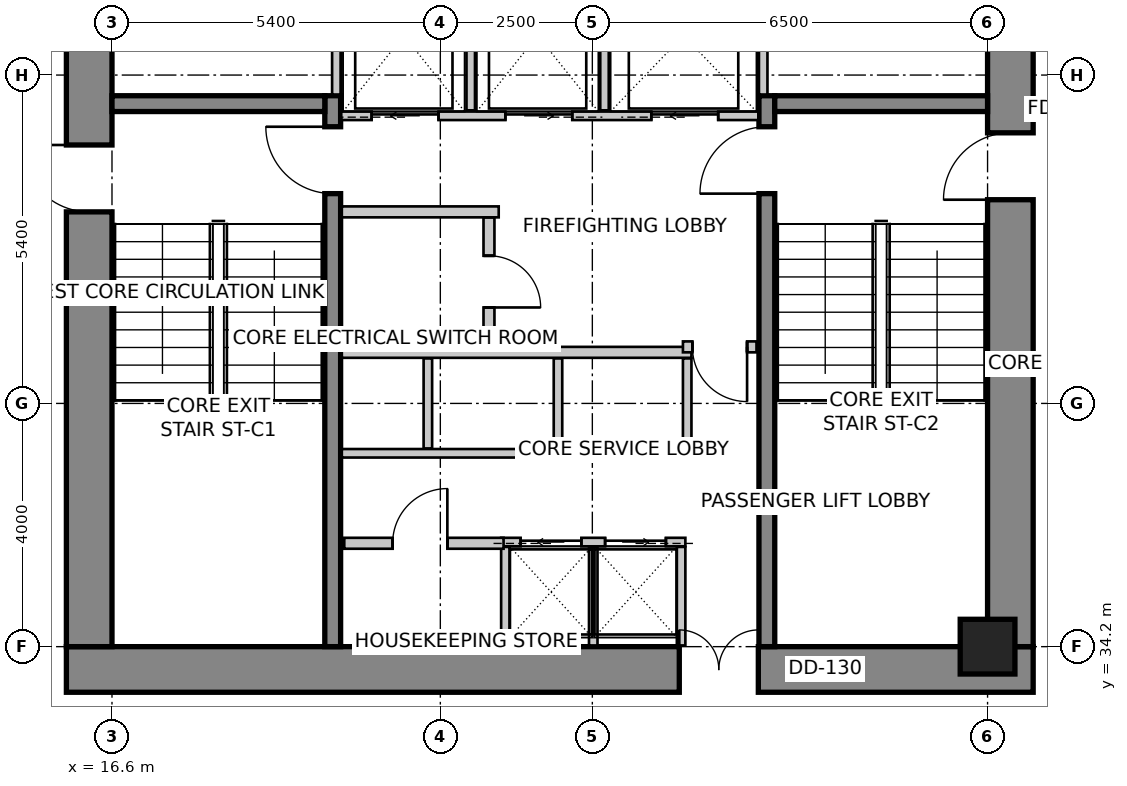
"""IFC4 building model, lengths in metres.
Left out: names, types, materials, properties, quantities, classifications, styles, units other than length and angle.
Written with IfcOpenShell. Run it as: python <this file> out.ifc"""

import sys

from ifc_helpers import new_model, si_unit, direction, frame, frame_2d, origin, origin_2d, place, context, subcontext, project, spatial, rectangle, extrude, source, transform, mapped, element, fill, save


model = new_model("IFC4")
c1 = context("Model", 3, precision=1e-05, world=origin(), true_north=direction((0.0, 1.0)))
c2 = subcontext(c1, "Body", "Model", "MODEL_VIEW")
j1 = project(units=[si_unit("LENGTHUNIT", "METRE"), si_unit("PLANEANGLEUNIT", "RADIAN")], contexts=[c1])
p1 = place(None, origin())
s1 = spatial("IfcSite", under=j1, at=p1, CompositionType="ELEMENT")
p2 = place(p1, origin())
s2 = spatial("IfcBuilding", under=s1, at=p2, CompositionType="ELEMENT")
p3 = place(p2, frame((0.0, 0.0, 128.6)))
s3 = spatial("IfcBuildingStorey", under=s2, at=p3, CompositionType="ELEMENT", Elevation=128.6)
p4 = place(p3, frame((15.85, 33.825, 0.0), z_axis=(0.0, 0.0, 1.0), x_axis=(1.0, 0.0, 0.0)))
e1 = element("IfcWall", 1, at=p4, inside=s3, PredefinedType="SHEAR", context=c2, shape_type="SweptSolid", body=[
    extrude(rectangle(XDim=15.9, YDim=0.75, at=frame_2d((7.95, 0.0))), origin(), (0.0, 0.0, 1.0), 3.6),
])
m1 = source(origin(), c2, "Body", "SweptSolid", [
    extrude(rectangle(XDim=1.3, YDim=2.15, at=frame_2d((0.65, 1.075))), frame((0.0, 0.385, 0.0), z_axis=(0.0, -1.0, 0.0), x_axis=(1.0, 0.0, 0.0)), (0.0, 0.0, 1.0), 0.77),
])
p5 = place(p4, frame((10.08, 0.0, 0.0)))
e2 = element("IfcOpeningElement", 2, at=p5, cuts=e1, PredefinedType="OPENING", context=c2, shape_type="MappedRepresentation", body=[
    mapped(m1, transform((0.0, 0.0, 0.0), scale=1.0)),
])
p6 = place(p3, frame((16.225, 34.2, 0.0), z_axis=(0.0, 0.0, 1.0), x_axis=(0.0, 1.0, 0.0)))
e3 = element("IfcWall", 3, at=p6, inside=s3, PredefinedType="SHEAR", context=c2, shape_type="SweptSolid", body=[
    extrude(rectangle(XDim=11.4, YDim=0.75, at=frame_2d((5.7, 0.0))), origin(), (0.0, 0.0, 1.0), 3.6),
])
m2 = source(origin(), c2, "Body", "SweptSolid", [
    extrude(rectangle(XDim=1.1, YDim=2.15, at=frame_2d((0.55, 1.075))), frame((0.0, 0.385, 0.0), z_axis=(0.0, -1.0, 0.0), x_axis=(1.0, 0.0, 0.0)), (0.0, 0.0, 1.0), 0.77),
])
p7 = place(p6, frame((7.15, 0.0, 0.0)))
e4 = element("IfcOpeningElement", 4, at=p7, cuts=e3, PredefinedType="OPENING", context=c2, shape_type="MappedRepresentation", body=[
    mapped(m2, transform((0.0, 0.0, 0.0), scale=1.0)),
])
p8 = place(p3, frame((31.375, 34.2, 0.0), z_axis=(0.0, 0.0, 1.0), x_axis=(0.0, 1.0, 0.0)))
e5 = element("IfcWall", 5, at=p8, inside=s3, PredefinedType="SHEAR", context=c2, shape_type="SweptSolid", body=[
    extrude(rectangle(XDim=11.4, YDim=0.75, at=frame_2d((5.7, 0.0))), origin(), (0.0, 0.0, 1.0), 3.6),
])
p9 = place(p8, frame((7.35, 0.0, 0.0)))
e6 = element("IfcOpeningElement", 6, at=p9, cuts=e5, PredefinedType="OPENING", context=c2, shape_type="MappedRepresentation", body=[
    mapped(m2, transform((0.0, 0.0, 0.0), scale=1.0)),
])
p10 = place(p3, frame((20.23, 34.2, 0.0), z_axis=(0.0, 0.0, 1.0), x_axis=(0.0, 1.0, 0.0)))
e7 = element("IfcWall", 7, at=p10, inside=s3, PredefinedType="SHEAR", context=c2, shape_type="SweptSolid", body=[
    extrude(rectangle(XDim=9.06, YDim=0.26, at=frame_2d((4.53, 0.0))), origin(), (0.0, 0.0, 1.0), 3.6),
])
m3 = source(origin(), c2, "Body", "SweptSolid", [
    extrude(rectangle(XDim=1.1, YDim=2.15, at=frame_2d((0.55, 1.075))), frame((0.0, 0.14, 0.0), z_axis=(0.0, -1.0, 0.0), x_axis=(1.0, 0.0, 0.0)), (0.0, 0.0, 1.0), 0.28),
])
p11 = place(p10, frame((7.45, 0.0, 0.0)))
e8 = element("IfcOpeningElement", 8, at=p11, cuts=e7, PredefinedType="OPENING", context=c2, shape_type="MappedRepresentation", body=[
    mapped(m3, transform((0.0, 0.0, 0.0), scale=1.0)),
])
p12 = place(p3, frame((27.37, 34.2, 0.0), z_axis=(0.0, 0.0, 1.0), x_axis=(0.0, 1.0, 0.0)))
e9 = element("IfcWall", 9, at=p12, inside=s3, PredefinedType="SHEAR", context=c2, shape_type="SweptSolid", body=[
    extrude(rectangle(XDim=9.06, YDim=0.26, at=frame_2d((4.53, 0.0))), origin(), (0.0, 0.0, 1.0), 3.6),
])
p13 = place(p12, frame((7.45, 0.0, 0.0)))
e10 = element("IfcOpeningElement", 10, at=p13, cuts=e9, PredefinedType="OPENING", context=c2, shape_type="MappedRepresentation", body=[
    mapped(m3, transform((0.0, 0.0, 0.0), scale=1.0)),
])
for number, where, z_axis, x_axis in (
    (11, (16.6, 43.13, 0.0), (0.0, 0.0, 1.0), (1.0, 0.0, 0.0)),
    (12, (27.5, 43.13, 0.0), (0.0, 0.0, 1.0), (1.0, 0.0, 0.0)),
):
    element("IfcWall", number, at=place(p3, frame(where, z_axis=z_axis, x_axis=x_axis)), inside=s3, PredefinedType="SHEAR", context=c2, shape_type="SweptSolid", body=[
        extrude(rectangle(XDim=3.5, YDim=0.26, at=frame_2d((1.75, 0.0))), origin(), (0.0, 0.0, 1.0), 3.6),
    ])
m4 = source(origin(), c2, "Body", "SweptSolid", [
    extrude(rectangle(XDim=0.9, YDim=0.9, at=origin_2d()), origin(), (0.0, 0.0, 1.0), 3.6),
])
p14 = place(p3, frame((31.0, 34.2, 0.0), z_axis=(0.0, 0.0, 1.0), x_axis=(1.0, 0.0, 0.0)))
e13 = element("IfcColumn", 13, at=p14, inside=s3, PredefinedType="COLUMN", context=c2, shape_type="MappedRepresentation", body=[
    mapped(m4, transform((0.0, 0.0, 0.0), scale=1.0)),
])
p15 = place(p3, frame((20.37, 42.93, 0.0), z_axis=(0.0, 0.0, 1.0), x_axis=(1.0, 0.0, 0.0)))
e14 = element("IfcWall", 14, at=p15, inside=s3, PredefinedType="SOLIDWALL", context=c2, shape_type="SweptSolid", body=[
    extrude(rectangle(XDim=6.86, YDim=0.14, at=frame_2d((3.43, 0.0))), origin(), (0.0, 0.0, 1.0), 3.35),
])
m5 = source(origin(), c2, "Body", "SweptSolid", [
    extrude(rectangle(XDim=1.1, YDim=2.15, at=frame_2d((0.55, 1.075))), frame((0.0, 0.08, 0.0), z_axis=(0.0, -1.0, 0.0), x_axis=(1.0, 0.0, 0.0)), (0.0, 0.0, 1.0), 0.16),
])
p16 = place(p15, frame((0.5, 0.0, 0.0)))
e15 = element("IfcOpeningElement", 15, at=p16, cuts=e14, PredefinedType="OPENING", context=c2, shape_type="MappedRepresentation", body=[
    mapped(m5, transform((0.0, 0.0, 0.0), scale=1.0)),
])
p17 = place(p15, frame((2.7, 0.0, 0.0)))
e16 = element("IfcOpeningElement", 16, at=p17, cuts=e14, PredefinedType="OPENING", context=c2, shape_type="MappedRepresentation", body=[
    mapped(m5, transform((0.0, 0.0, 0.0), scale=1.0)),
])
p18 = place(p15, frame((5.1, 0.0, 0.0)))
e17 = element("IfcOpeningElement", 17, at=p18, cuts=e14, PredefinedType="OPENING", context=c2, shape_type="MappedRepresentation", body=[
    mapped(m5, transform((0.0, 0.0, 0.0), scale=1.0)),
])
for number, where, z_axis, x_axis in (
    (18, (20.29, 43.28, 0.0), (0.0, 0.0, 1.0), (0.0, 1.0, 0.0)),
    (19, (27.31, 43.28, 0.0), (0.0, 0.0, 1.0), (0.0, 1.0, 0.0)),
):
    element("IfcWall", number, at=place(p3, frame(where, z_axis=z_axis, x_axis=x_axis)), inside=s3, PredefinedType="SOLIDWALL", context=c2, shape_type="SweptSolid", body=[
        extrude(rectangle(XDim=2.3, YDim=0.14, at=frame_2d((1.15, 0.0))), origin(), (0.0, 0.0, 1.0), 3.35),
    ])
for number, where, z_axis, x_axis in (
    (20, (22.5, 43.02, 0.0), (0.0, 0.0, 1.0), (0.0, 1.0, 0.0)),
    (21, (24.7, 43.02, 0.0), (0.0, 0.0, 1.0), (0.0, 1.0, 0.0)),
):
    element("IfcWall", number, at=place(p3, frame(where, z_axis=z_axis, x_axis=x_axis)), inside=s3, PredefinedType="SOLIDWALL", context=c2, shape_type="SweptSolid", body=[
        extrude(rectangle(XDim=2.56, YDim=0.14, at=frame_2d((1.28, 0.0))), origin(), (0.0, 0.0, 1.0), 3.35),
    ])
p19 = place(p3, frame((23.0, 35.92, 0.0), z_axis=(0.0, 0.0, 1.0), x_axis=(1.0, 0.0, 0.0)))
e22 = element("IfcWall", 22, at=p19, inside=s3, PredefinedType="SOLIDWALL", context=c2, shape_type="SweptSolid", body=[
    extrude(rectangle(XDim=3.03, YDim=0.14, at=frame_2d((1.515, 0.0))), origin(), (0.0, 0.0, 1.0), 3.35),
])
m6 = source(origin(), c2, "Body", "SweptSolid", [
    extrude(rectangle(XDim=1.0, YDim=2.15, at=frame_2d((0.5, 1.075))), frame((0.0, 0.08, 0.0), z_axis=(0.0, -1.0, 0.0), x_axis=(1.0, 0.0, 0.0)), (0.0, 0.0, 1.0), 0.16),
])
p20 = place(p19, frame((0.32, 0.0, 0.0)))
e23 = element("IfcOpeningElement", 23, at=p20, cuts=e22, PredefinedType="OPENING", context=c2, shape_type="MappedRepresentation", body=[
    mapped(m6, transform((0.0, 0.0, 0.0), scale=1.0)),
])
p21 = place(p19, frame((1.71, 0.0, 0.0)))
e24 = element("IfcOpeningElement", 24, at=p21, cuts=e22, PredefinedType="OPENING", context=c2, shape_type="MappedRepresentation", body=[
    mapped(m6, transform((0.0, 0.0, 0.0), scale=1.0)),
])
for number, where, z_axis, x_axis in (
    (25, (25.96, 34.22, 0.0), (0.0, 0.0, 1.0), (0.0, 1.0, 0.0)),
    (26, (23.07, 34.22, 0.0), (0.0, 0.0, 1.0), (0.0, 1.0, 0.0)),
    (27, (24.515, 34.22, 0.0), (0.0, 0.0, 1.0), (0.0, 1.0, 0.0)),
):
    element("IfcWall", number, at=place(p3, frame(where, z_axis=z_axis, x_axis=x_axis)), inside=s3, PredefinedType="SOLIDWALL", context=c2, shape_type="SweptSolid", body=[
        extrude(rectangle(XDim=1.62, YDim=0.14, at=frame_2d((0.81, 0.0))), origin(), (0.0, 0.0, 1.0), 2.642),
    ])
p22 = place(p3, frame((20.38, 37.38, 0.0), z_axis=(0.0, 0.0, 1.0), x_axis=(1.0, 0.0, 0.0)))
e28 = element("IfcWall", 28, at=p22, inside=s3, PredefinedType="SOLIDWALL", context=c2, shape_type="SweptSolid", body=[
    extrude(rectangle(XDim=5.75, YDim=0.14, at=frame_2d((2.875, 0.0))), origin(), (0.0, 0.0, 1.0), 3.35),
])
p23 = place(p3, frame((20.38, 39.04, 0.0), z_axis=(0.0, 0.0, 1.0), x_axis=(1.0, 0.0, 0.0)))
e29 = element("IfcWall", 29, at=p23, inside=s3, PredefinedType="SOLIDWALL", context=c2, shape_type="SweptSolid", body=[
    extrude(rectangle(XDim=5.75, YDim=0.18, at=frame_2d((2.875, 0.0))), origin(), (0.0, 0.0, 1.0), 3.35),
])
for number, where, z_axis, x_axis in (
    (30, (26.06, 37.46, 0.0), (0.0, 0.0, 1.0), (0.0, 1.0, 0.0)),
    (31, (21.795, 37.46, 0.0), (0.0, 0.0, 1.0), (0.0, 1.0, 0.0)),
    (32, (23.935, 37.46, 0.0), (0.0, 0.0, 1.0), (0.0, 1.0, 0.0)),
):
    element("IfcWall", number, at=place(p3, frame(where, z_axis=z_axis, x_axis=x_axis)), inside=s3, PredefinedType="SOLIDWALL", context=c2, shape_type="SweptSolid", body=[
        extrude(rectangle(XDim=1.48, YDim=0.14, at=frame_2d((0.74, 0.0))), origin(), (0.0, 0.0, 1.0), 3.35),
    ])
p24 = place(p3, frame((22.96, 41.35, 0.0), z_axis=(0.0, 0.0, 1.0), x_axis=(-1.0, 0.0, 0.0)))
e33 = element("IfcWall", 33, at=p24, inside=s3, PredefinedType="PARTITIONING", context=c2, shape_type="SweptSolid", body=[
    extrude(rectangle(XDim=2.58, YDim=0.18, at=frame_2d((1.29, 0.0))), origin(), (0.0, 0.0, 1.0), 3.35),
])
p25 = place(p3, frame((22.8, 41.256, 0.0), z_axis=(0.0, 0.0, 1.0), x_axis=(0.0, -1.0, 0.0)))
e34 = element("IfcWall", 34, at=p25, inside=s3, PredefinedType="PARTITIONING", context=c2, shape_type="SweptSolid", body=[
    extrude(rectangle(XDim=2.106, YDim=0.18, at=frame_2d((1.053, 0.0))), origin(), (0.0, 0.0, 1.0), 3.35),
])
m7 = source(origin(), c2, "Body", "SweptSolid", [
    extrude(rectangle(XDim=0.85, YDim=2.15, at=frame_2d((0.425, 1.075))), frame((0.0, 0.1, 0.0), z_axis=(0.0, -1.0, 0.0), x_axis=(1.0, 0.0, 0.0)), (0.0, 0.0, 1.0), 0.2),
])
p26 = place(p25, frame((0.628, 0.0, 0.0)))
e35 = element("IfcOpeningElement", 35, at=p26, cuts=e34, PredefinedType="OPENING", context=c2, shape_type="MappedRepresentation", body=[
    mapped(m7, transform((0.0, 0.0, 0.0), scale=1.0)),
])
p27 = place(p3, frame((27.2, 39.13, 0.0), z_axis=(0.0, 0.0, 1.0), x_axis=(-1.0, 0.0, 0.0)))
e36 = element("IfcWall", 36, at=p27, inside=s3, PredefinedType="PARTITIONING", context=c2, shape_type="SweptSolid", body=[
    extrude(rectangle(XDim=1.21, YDim=0.18, at=frame_2d((0.605, 0.0))), origin(), (0.0, 0.0, 1.0), 3.35),
])
m8 = source(origin(), c2, "Body", "SweptSolid", [
    extrude(rectangle(XDim=0.9, YDim=2.15, at=frame_2d((0.45, 1.075))), frame((0.0, 0.1, 0.0), z_axis=(0.0, -1.0, 0.0), x_axis=(1.0, 0.0, 0.0)), (0.0, 0.0, 1.0), 0.2),
])
p28 = place(p27, frame((0.155, 0.0, 0.0)))
e37 = element("IfcOpeningElement", 37, at=p28, cuts=e36, PredefinedType="OPENING", context=c2, shape_type="MappedRepresentation", body=[
    mapped(m8, transform((0.0, 0.0, 0.0), scale=1.0)),
])
p29 = place(p3, frame((20.42, 35.9, 0.0), z_axis=(0.0, 0.0, 1.0), x_axis=(1.0, 0.0, 0.0)))
e38 = element("IfcWall", 38, at=p29, inside=s3, PredefinedType="PARTITIONING", context=c2, shape_type="SweptSolid", body=[
    extrude(rectangle(XDim=2.62, YDim=0.18, at=frame_2d((1.31, 0.0))), origin(), (0.0, 0.0, 1.0), 3.35),
])
p30 = place(p29, frame((0.796, 0.0, 0.0)))
e39 = element("IfcOpeningElement", 39, at=p30, cuts=e38, PredefinedType="OPENING", context=c2, shape_type="MappedRepresentation", body=[
    mapped(m8, transform((0.0, 0.0, 0.0), scale=1.0)),
])
m9 = source(origin(), c2, "Body", "SweptSolid", [
    extrude(rectangle(XDim=1.1, YDim=2.15, at=frame_2d((0.55, 1.075))), frame((0.0, 0.025, 0.0), z_axis=(0.0, -1.0, 0.0), x_axis=(1.0, 0.0, 0.0)), (0.0, 0.0, 1.0), 0.05),
])
p31 = place(p16, origin())
e40 = element("IfcDoor", 40, at=p31, inside=s3, OperationType="SLIDING_TO_LEFT", PredefinedType="DOOR", context=c2, shape_type="MappedRepresentation", body=[
    mapped(m9, transform((0.0, 0.0, 0.0), scale=1.0)),
])
fill(e15, e40)
p32 = place(p17, origin())
e41 = element("IfcDoor", 41, at=p32, inside=s3, OperationType="SLIDING_TO_RIGHT", PredefinedType="DOOR", context=c2, shape_type="MappedRepresentation", body=[
    mapped(m9, transform((0.0, 0.0, 0.0), scale=1.0)),
])
fill(e16, e41)
m10 = source(origin(), c2, "Body", "SweptSolid", [
    extrude(rectangle(XDim=1.1, YDim=2.15, at=frame_2d((0.55, 1.075))), frame((0.0, 0.025, 0.0), z_axis=(0.0, -1.0, 0.0), x_axis=(1.0, 0.0, 0.0)), (0.0, 0.0, 1.0), 0.05),
])
p33 = place(p18, origin())
e42 = element("IfcDoor", 42, at=p33, inside=s3, OperationType="SLIDING_TO_LEFT", PredefinedType="DOOR", context=c2, shape_type="MappedRepresentation", body=[
    mapped(m10, transform((0.0, 0.0, 0.0), scale=1.0)),
])
fill(e17, e42)
m11 = source(origin(), c2, "Body", "SweptSolid", [
    extrude(rectangle(XDim=1.0, YDim=2.15, at=frame_2d((0.5, 1.075))), frame((0.0, 0.025, 0.0), z_axis=(0.0, -1.0, 0.0), x_axis=(1.0, 0.0, 0.0)), (0.0, 0.0, 1.0), 0.05),
])
p34 = place(p20, origin())
e43 = element("IfcDoor", 43, at=p34, inside=s3, OperationType="SLIDING_TO_LEFT", PredefinedType="DOOR", context=c2, shape_type="MappedRepresentation", body=[
    mapped(m11, transform((0.0, 0.0, 0.0), scale=1.0)),
])
fill(e23, e43)
p35 = place(p21, origin())
e44 = element("IfcDoor", 44, at=p35, inside=s3, OperationType="SLIDING_TO_RIGHT", PredefinedType="DOOR", context=c2, shape_type="MappedRepresentation", body=[
    mapped(m11, transform((0.0, 0.0, 0.0), scale=1.0)),
])
fill(e24, e44)
m12 = source(origin(), c2, "Body", "SweptSolid", [
    extrude(rectangle(XDim=1.1, YDim=2.15, at=frame_2d((0.55, 1.075))), frame((0.0, 0.025, 0.0), z_axis=(0.0, -1.0, 0.0), x_axis=(1.0, 0.0, 0.0)), (0.0, 0.0, 1.0), 0.05),
])
p36 = place(p11, origin())
e45 = element("IfcDoor", 45, at=p36, inside=s3, OperationType="SINGLE_SWING_RIGHT", PredefinedType="DOOR", context=c2, shape_type="MappedRepresentation", body=[
    mapped(m12, transform((0.0, 0.0, 0.0), scale=1.0)),
])
fill(e8, e45)
p37 = place(p13, origin())
e46 = element("IfcDoor", 46, at=p37, inside=s3, OperationType="SINGLE_SWING_LEFT", PredefinedType="DOOR", context=c2, shape_type="MappedRepresentation", body=[
    mapped(m12, transform((0.0, 0.0, 0.0), scale=1.0)),
])
fill(e10, e46)
p38 = place(p7, origin())
e47 = element("IfcDoor", 47, at=p38, inside=s3, OperationType="SINGLE_SWING_RIGHT", PredefinedType="DOOR", context=c2, shape_type="MappedRepresentation", body=[
    mapped(m12, transform((0.0, 0.0, 0.0), scale=1.0)),
])
fill(e4, e47)
p39 = place(p9, origin())
e48 = element("IfcDoor", 48, at=p39, inside=s3, OperationType="SINGLE_SWING_LEFT", PredefinedType="DOOR", context=c2, shape_type="MappedRepresentation", body=[
    mapped(m12, transform((0.0, 0.0, 0.0), scale=1.0)),
])
fill(e6, e48)
m13 = source(origin(), c2, "Body", "SweptSolid", [
    extrude(rectangle(XDim=1.3, YDim=2.15, at=frame_2d((0.65, 1.075))), frame((0.0, 0.025, 0.0), z_axis=(0.0, -1.0, 0.0), x_axis=(1.0, 0.0, 0.0)), (0.0, 0.0, 1.0), 0.05),
])
p40 = place(p5, origin())
e49 = element("IfcDoor", 49, at=p40, inside=s3, OperationType="DOUBLE_DOOR_SINGLE_SWING", PredefinedType="DOOR", context=c2, shape_type="MappedRepresentation", body=[
    mapped(m13, transform((0.0, 0.0, 0.0), scale=1.0)),
])
fill(e2, e49)
m14 = source(origin(), c2, "Body", "SweptSolid", [
    extrude(rectangle(XDim=0.85, YDim=2.15, at=frame_2d((0.425, 1.075))), frame((0.0, 0.025, 0.0), z_axis=(0.0, -1.0, 0.0), x_axis=(1.0, 0.0, 0.0)), (0.0, 0.0, 1.0), 0.05),
])
p41 = place(p26, origin())
e50 = element("IfcDoor", 50, at=p41, inside=s3, OperationType="SINGLE_SWING_RIGHT", PredefinedType="DOOR", context=c2, shape_type="MappedRepresentation", body=[
    mapped(m14, transform((0.0, 0.0, 0.0), scale=1.0)),
])
fill(e35, e50)
m15 = source(origin(), c2, "Body", "SweptSolid", [
    extrude(rectangle(XDim=0.9, YDim=2.15, at=frame_2d((0.45, 1.075))), frame((0.0, 0.025, 0.0), z_axis=(0.0, -1.0, 0.0), x_axis=(1.0, 0.0, 0.0)), (0.0, 0.0, 1.0), 0.05),
])
p42 = place(p28, origin())
e51 = element("IfcDoor", 51, at=p42, inside=s3, OperationType="SINGLE_SWING_LEFT", PredefinedType="DOOR", context=c2, shape_type="MappedRepresentation", body=[
    mapped(m15, transform((0.0, 0.0, 0.0), scale=1.0)),
])
fill(e37, e51)
p43 = place(p30, origin())
e52 = element("IfcDoor", 52, at=p43, inside=s3, OperationType="SINGLE_SWING_RIGHT", PredefinedType="DOOR", context=c2, shape_type="MappedRepresentation", body=[
    mapped(m15, transform((0.0, 0.0, 0.0), scale=1.0)),
])
fill(e39, e52)
save(model, sys.argv[1])
